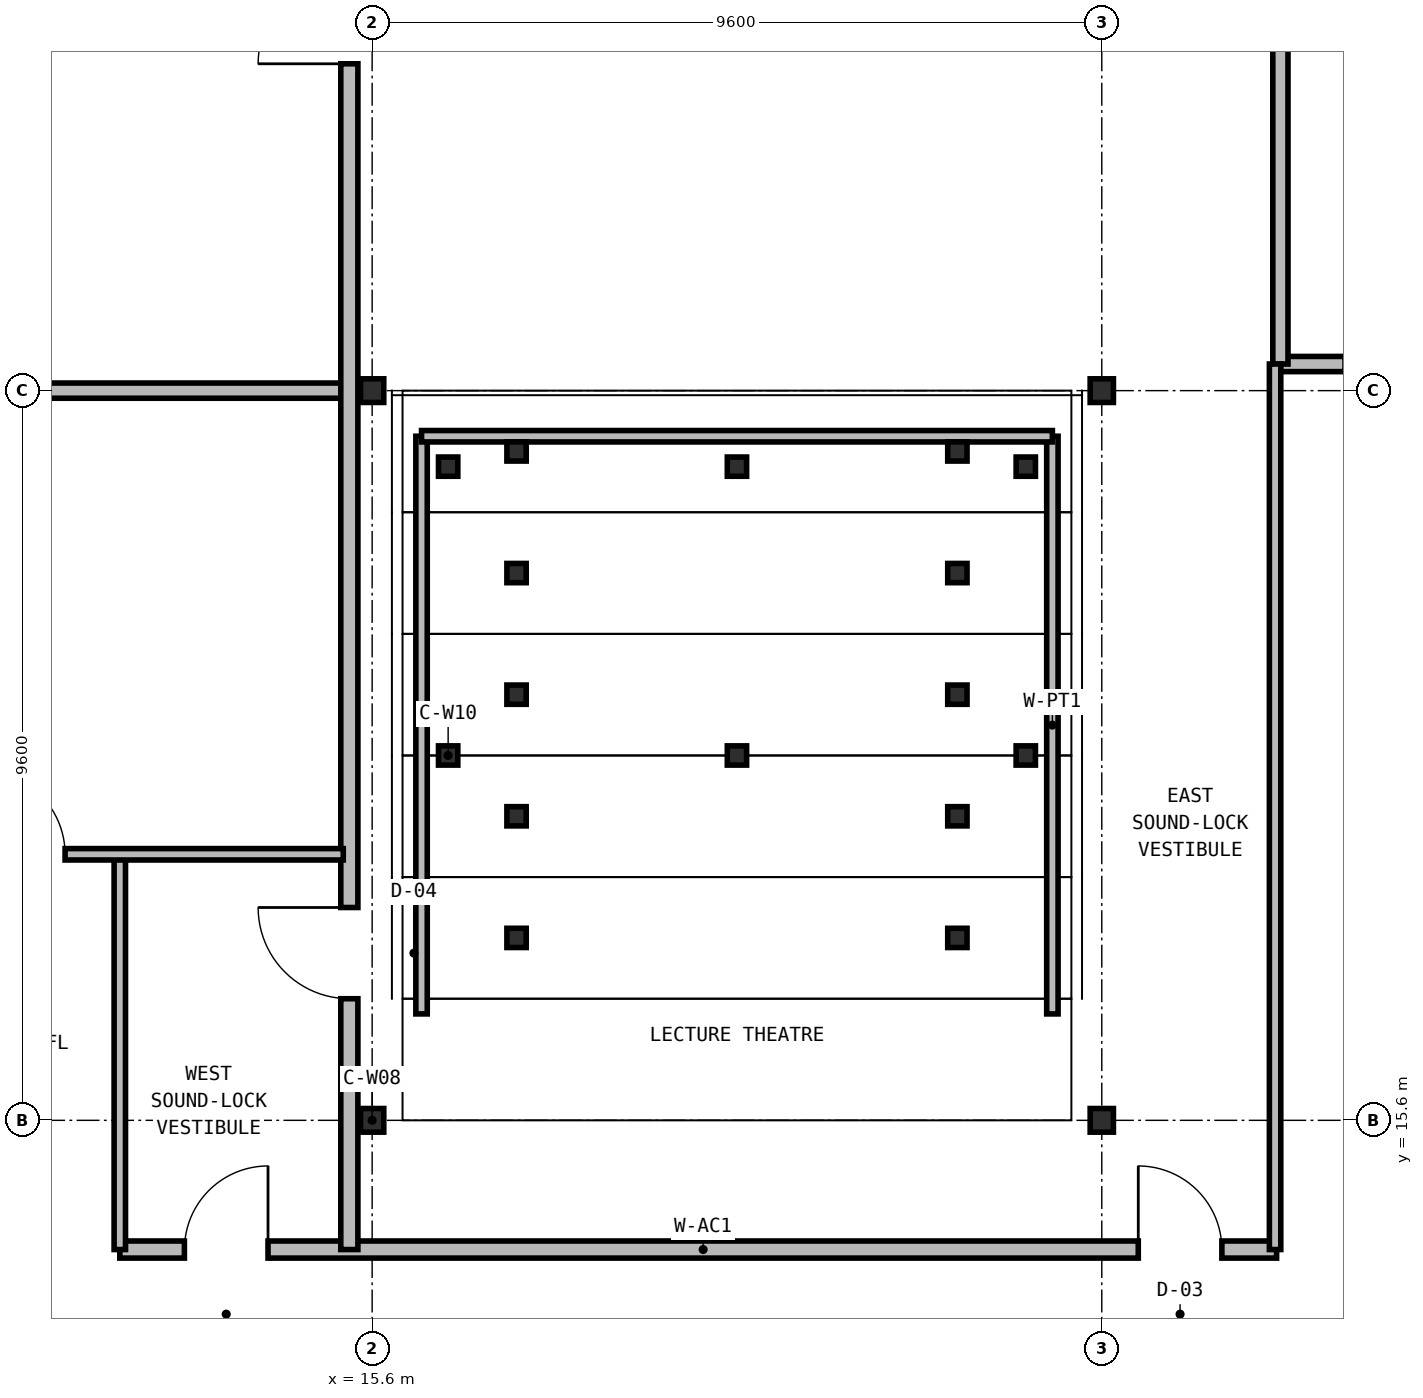
"""IFC4 building model, lengths in metres.
Left out: names, types, materials, properties, quantities, classifications, styles, units other than length and angle.
Written with IfcOpenShell. Run it as: python <this file> out.ifc"""

import sys

from ifc_helpers import new_model, si_unit, direction, frame, frame_2d, origin, origin_2d, place, context, subcontext, project, spatial, rectangle, i_section, extrude, element, fill, save


model = new_model("IFC4")
c1 = context("Model", 3, precision=1e-05, world=origin(), true_north=direction((0.0, 1.0)))
c2 = subcontext(c1, "Body", "Model", "MODEL_VIEW")
j1 = project(units=[si_unit("LENGTHUNIT", "METRE"), si_unit("PLANEANGLEUNIT", "RADIAN")], contexts=[c1])
p1 = place(None, origin())
s1 = spatial("IfcSite", under=j1, at=p1, CompositionType="ELEMENT")
p2 = place(p1, origin())
s2 = spatial("IfcBuilding", under=s1, at=p2, CompositionType="ELEMENT")
p3 = place(p2, origin())
s3 = spatial("IfcBuildingStorey", under=s2, at=p3, CompositionType="ELEMENT", Elevation=0.0)
for number, where, z_axis, x_axis in (
    (1, (15.6, 15.6, 0.0), (0.0, 0.0, 1.0), (1.0, 0.0, 0.0)),
    (2, (15.6, 25.2, 0.0), (0.0, 0.0, 1.0), (1.0, 0.0, 0.0)),
    (3, (25.2, 15.6, 0.0), (0.0, 0.0, 1.0), (1.0, 0.0, 0.0)),
    (4, (25.2, 25.2, 0.0), (0.0, 0.0, 1.0), (1.0, 0.0, 0.0)),
):
    element("IfcColumn", number, at=place(p3, frame(where, z_axis=z_axis, x_axis=x_axis)), inside=s3, PredefinedType="COLUMN", context=c2, shape_type="SweptSolid", body=[
        extrude(i_section(OverallWidth=0.306, OverallDepth=0.311, WebThickness=0.011, FlangeThickness=0.017, at=origin_2d()), origin(), (0.0, 0.0, 1.0), 5.25),
    ])
p4 = place(p3, frame((16.6, 20.4, 0.0), z_axis=(0.0, 0.0, 1.0), x_axis=(1.0, 0.0, 0.0)))
e5 = element("IfcColumn", 5, at=p4, inside=s3, PredefinedType="COLUMN", context=c2, shape_type="SweptSolid", body=[
    extrude(i_section(OverallWidth=0.254, OverallDepth=0.253, WebThickness=0.009, FlangeThickness=0.014, at=origin_2d()), origin(), (0.0, 0.0, 1.0), 1.18),
])
p5 = place(p3, frame((16.6, 24.2, 0.0), z_axis=(0.0, 0.0, 1.0), x_axis=(1.0, 0.0, 0.0)))
e6 = element("IfcColumn", 6, at=p5, inside=s3, PredefinedType="COLUMN", context=c2, shape_type="SweptSolid", body=[
    extrude(i_section(OverallWidth=0.254, OverallDepth=0.253, WebThickness=0.009, FlangeThickness=0.014, at=origin_2d()), origin(), (0.0, 0.0, 1.0), 2.42),
])
p6 = place(p3, frame((20.4, 20.4, 0.0), z_axis=(0.0, 0.0, 1.0), x_axis=(1.0, 0.0, 0.0)))
e7 = element("IfcColumn", 7, at=p6, inside=s3, PredefinedType="COLUMN", context=c2, shape_type="SweptSolid", body=[
    extrude(i_section(OverallWidth=0.254, OverallDepth=0.253, WebThickness=0.009, FlangeThickness=0.014, at=origin_2d()), origin(), (0.0, 0.0, 1.0), 1.18),
])
p7 = place(p3, frame((20.4, 24.2, 0.0), z_axis=(0.0, 0.0, 1.0), x_axis=(1.0, 0.0, 0.0)))
e8 = element("IfcColumn", 8, at=p7, inside=s3, PredefinedType="COLUMN", context=c2, shape_type="SweptSolid", body=[
    extrude(i_section(OverallWidth=0.254, OverallDepth=0.253, WebThickness=0.009, FlangeThickness=0.014, at=origin_2d()), origin(), (0.0, 0.0, 1.0), 2.42),
])
p8 = place(p3, frame((24.2, 20.4, 0.0), z_axis=(0.0, 0.0, 1.0), x_axis=(1.0, 0.0, 0.0)))
e9 = element("IfcColumn", 9, at=p8, inside=s3, PredefinedType="COLUMN", context=c2, shape_type="SweptSolid", body=[
    extrude(i_section(OverallWidth=0.254, OverallDepth=0.253, WebThickness=0.009, FlangeThickness=0.014, at=origin_2d()), origin(), (0.0, 0.0, 1.0), 1.18),
])
p9 = place(p3, frame((24.2, 24.2, 0.0), z_axis=(0.0, 0.0, 1.0), x_axis=(1.0, 0.0, 0.0)))
e10 = element("IfcColumn", 10, at=p9, inside=s3, PredefinedType="COLUMN", context=c2, shape_type="SweptSolid", body=[
    extrude(i_section(OverallWidth=0.254, OverallDepth=0.253, WebThickness=0.009, FlangeThickness=0.014, at=origin_2d()), origin(), (0.0, 0.0, 1.0), 2.42),
])
for number, where, z_axis, x_axis in (
    (11, (17.5, 18.0, 0.0), (0.0, 0.0, 1.0), (1.0, 0.0, 0.0)),
    (12, (23.3, 18.0, 0.0), (0.0, 0.0, 1.0), (1.0, 0.0, 0.0)),
):
    element("IfcColumn", number, at=place(p3, frame(where, z_axis=z_axis, x_axis=x_axis)), inside=s3, PredefinedType="COLUMN", context=c2, shape_type="SweptSolid", body=[
        extrude(i_section(OverallWidth=0.254, OverallDepth=0.253, WebThickness=0.009, FlangeThickness=0.014, at=origin_2d()), origin(), (0.0, 0.0, 1.0), 0.74),
    ])
for number, where, z_axis, x_axis in (
    (13, (17.5, 19.6, 0.0), (0.0, 0.0, 1.0), (1.0, 0.0, 0.0)),
    (14, (23.3, 19.6, 0.0), (0.0, 0.0, 1.0), (1.0, 0.0, 0.0)),
):
    element("IfcColumn", number, at=place(p3, frame(where, z_axis=z_axis, x_axis=x_axis)), inside=s3, PredefinedType="COLUMN", context=c2, shape_type="SweptSolid", body=[
        extrude(i_section(OverallWidth=0.254, OverallDepth=0.253, WebThickness=0.009, FlangeThickness=0.014, at=origin_2d()), origin(), (0.0, 0.0, 1.0), 1.19),
    ])
for number, where, z_axis, x_axis in (
    (15, (17.5, 21.2, 0.0), (0.0, 0.0, 1.0), (1.0, 0.0, 0.0)),
    (16, (23.3, 21.2, 0.0), (0.0, 0.0, 1.0), (1.0, 0.0, 0.0)),
):
    element("IfcColumn", number, at=place(p3, frame(where, z_axis=z_axis, x_axis=x_axis)), inside=s3, PredefinedType="COLUMN", context=c2, shape_type="SweptSolid", body=[
        extrude(i_section(OverallWidth=0.254, OverallDepth=0.253, WebThickness=0.009, FlangeThickness=0.014, at=origin_2d()), origin(), (0.0, 0.0, 1.0), 1.64),
    ])
for number, where, z_axis, x_axis in (
    (17, (17.5, 22.8, 0.0), (0.0, 0.0, 1.0), (1.0, 0.0, 0.0)),
    (18, (23.3, 22.8, 0.0), (0.0, 0.0, 1.0), (1.0, 0.0, 0.0)),
):
    element("IfcColumn", number, at=place(p3, frame(where, z_axis=z_axis, x_axis=x_axis)), inside=s3, PredefinedType="COLUMN", context=c2, shape_type="SweptSolid", body=[
        extrude(i_section(OverallWidth=0.254, OverallDepth=0.253, WebThickness=0.009, FlangeThickness=0.014, at=origin_2d()), origin(), (0.0, 0.0, 1.0), 2.09),
    ])
for number, where, z_axis, x_axis in (
    (19, (17.5, 24.4, 0.0), (0.0, 0.0, 1.0), (1.0, 0.0, 0.0)),
    (20, (23.3, 24.4, 0.0), (0.0, 0.0, 1.0), (1.0, 0.0, 0.0)),
):
    element("IfcColumn", number, at=place(p3, frame(where, z_axis=z_axis, x_axis=x_axis)), inside=s3, PredefinedType="COLUMN", context=c2, shape_type="SweptSolid", body=[
        extrude(i_section(OverallWidth=0.254, OverallDepth=0.253, WebThickness=0.009, FlangeThickness=0.014, at=origin_2d()), origin(), (0.0, 0.0, 1.0), 2.54),
    ])
p10 = place(p3, frame((6.16, 25.2, 0.0), z_axis=(0.0, 0.0, 1.0), x_axis=(1.0, 0.0, 0.0)))
e21 = element("IfcWall", 21, at=p10, inside=s3, PredefinedType="SOLIDWALL", context=c2, shape_type="SweptSolid", body=[
    extrude(rectangle(XDim=9.28, YDim=0.2, at=frame_2d((4.64, 0.0))), origin(), (0.0, 0.0, 1.0), 4.517),
])
p11 = place(p3, frame((27.55, 25.55, 0.0), z_axis=(0.0, 0.0, 1.0), x_axis=(1.0, 0.0, 0.0)))
e22 = element("IfcWall", 22, at=p11, inside=s3, PredefinedType="SOLIDWALL", context=c2, shape_type="SweptSolid", body=[
    extrude(rectangle(XDim=2.95, YDim=0.2, at=frame_2d((1.475, 0.0))), origin(), (0.0, 0.0, 1.0), 4.93),
])
p12 = place(p11, frame((0.85, 0.0, 0.0)))
e23 = element("IfcOpeningElement", 23, at=p12, cuts=e22, PredefinedType="OPENING", context=c2, shape_type="SweptSolid", body=[
    extrude(rectangle(XDim=1.1, YDim=2.15, at=frame_2d((0.55, 1.075))), frame((0.0, 0.11, 0.0), z_axis=(0.0, -1.0, 0.0), x_axis=(1.0, 0.0, 0.0)), (0.0, 0.0, 1.0), 0.22),
])
p13 = place(p3, frame((27.55, 25.55, 0.0), z_axis=(0.0, 0.0, 1.0), x_axis=(0.0, 1.0, 0.0)))
e24 = element("IfcWall", 24, at=p13, inside=s3, PredefinedType="SOLIDWALL", context=c2, shape_type="SweptSolid", body=[
    extrude(rectangle(XDim=9.09, YDim=0.2, at=frame_2d((4.545, 0.0))), origin(), (0.0, 0.0, 1.0), 4.93),
])
p14 = place(p13, frame((6.4, 0.0, 0.0)))
e25 = element("IfcOpeningElement", 25, at=p14, cuts=e24, PredefinedType="OPENING", context=c2, shape_type="SweptSolid", body=[
    extrude(rectangle(XDim=1.1, YDim=2.15, at=frame_2d((0.55, 1.075))), frame((0.0, 0.11, 0.0), z_axis=(0.0, -1.0, 0.0), x_axis=(1.0, 0.0, 0.0)), (0.0, 0.0, 1.0), 0.22),
])
for number, where, z_axis, x_axis in (
    (26, (16.25, 17.0, 0.0), (0.0, 0.0, 1.0), (0.0, 1.0, 0.0)),
    (27, (24.55, 17.0, 0.0), (0.0, 0.0, 1.0), (0.0, 1.0, 0.0)),
):
    element("IfcWall", number, at=place(p3, frame(where, z_axis=z_axis, x_axis=x_axis)), inside=s3, PredefinedType="PARTITIONING", context=c2, shape_type="SweptSolid", body=[
        extrude(rectangle(XDim=7.6, YDim=0.15, at=frame_2d((3.8, 0.0))), origin(), (0.0, 0.0, 1.0), 4.93),
    ])
p15 = place(p3, frame((16.25, 24.6, 0.0), z_axis=(0.0, 0.0, 1.0), x_axis=(1.0, 0.0, 0.0)))
e28 = element("IfcWall", 28, at=p15, inside=s3, PredefinedType="PARTITIONING", context=c2, shape_type="SweptSolid", body=[
    extrude(rectangle(XDim=8.3, YDim=0.15, at=frame_2d((4.15, 0.0))), origin(), (0.0, 0.0, 1.0), 4.93),
])
p16 = place(p3, frame((12.28, 13.9, 0.0), z_axis=(0.0, 0.0, 1.0), x_axis=(1.0, 0.0, 0.0)))
e29 = element("IfcWall", 29, at=p16, inside=s3, PredefinedType="SOLIDWALL", context=c2, shape_type="SweptSolid", body=[
    extrude(rectangle(XDim=15.22, YDim=0.225, at=frame_2d((7.61, 0.0))), origin(), (0.0, 0.0, 1.0), 4.93),
])
p17 = place(p16, frame((0.85, 0.0, 0.0)))
e30 = element("IfcOpeningElement", 30, at=p17, cuts=e29, PredefinedType="OPENING", context=c2, shape_type="SweptSolid", body=[
    extrude(rectangle(XDim=1.1, YDim=2.2, at=frame_2d((0.55, 1.1))), frame((0.0, 0.123, 0.0), z_axis=(0.0, -1.0, 0.0), x_axis=(1.0, 0.0, 0.0)), (0.0, 0.0, 1.0), 0.245),
])
p18 = place(p16, frame((13.4, 0.0, 0.0)))
e31 = element("IfcOpeningElement", 31, at=p18, cuts=e29, PredefinedType="OPENING", context=c2, shape_type="SweptSolid", body=[
    extrude(rectangle(XDim=1.1, YDim=2.2, at=frame_2d((0.55, 1.1))), frame((0.0, 0.123, 0.0), z_axis=(0.0, -1.0, 0.0), x_axis=(1.0, 0.0, 0.0)), (0.0, 0.0, 1.0), 0.245),
])
p19 = place(p3, frame((12.28, 13.9, 0.0), z_axis=(0.0, 0.0, 1.0), x_axis=(0.0, 1.0, 0.0)))
e32 = element("IfcWall", 32, at=p19, inside=s3, PredefinedType="PARTITIONING", context=c2, shape_type="SweptSolid", body=[
    extrude(rectangle(XDim=5.2, YDim=0.15, at=frame_2d((2.6, 0.0))), origin(), (0.0, 0.0, 1.0), 4.93),
])
p20 = place(p3, frame((27.48, 13.9, 0.0), z_axis=(0.0, 0.0, 1.0), x_axis=(0.0, 1.0, 0.0)))
e33 = element("IfcWall", 33, at=p20, inside=s3, PredefinedType="PARTITIONING", context=c2, shape_type="SweptSolid", body=[
    extrude(rectangle(XDim=11.65, YDim=0.15, at=frame_2d((5.825, 0.0))), origin(), (0.0, 0.0, 1.0), 4.93),
])
p21 = place(p3, frame((15.3, 13.9, 0.0), z_axis=(0.0, 0.0, 1.0), x_axis=(0.0, 1.0, 0.0)))
e34 = element("IfcWall", 34, at=p21, inside=s3, PredefinedType="SOLIDWALL", context=c2, shape_type="SweptSolid", body=[
    extrude(rectangle(XDim=20.74, YDim=0.225, at=frame_2d((10.37, 0.0))), origin(), (0.0, 0.0, 1.0), 4.93),
])
p22 = place(p21, frame((3.3, 0.0, 0.0)))
e35 = element("IfcOpeningElement", 35, at=p22, cuts=e34, PredefinedType="OPENING", context=c2, shape_type="SweptSolid", body=[
    extrude(rectangle(XDim=1.2, YDim=2.2, at=frame_2d((0.6, 1.1))), frame((0.0, 0.123, 0.0), z_axis=(0.0, -1.0, 0.0), x_axis=(1.0, 0.0, 0.0)), (0.0, 0.0, 1.0), 0.245),
])
p23 = place(p21, frame((15.6, 0.0, 0.0)))
e36 = element("IfcOpeningElement", 36, at=p23, cuts=e34, PredefinedType="OPENING", context=c2, shape_type="SweptSolid", body=[
    extrude(rectangle(XDim=1.2, YDim=2.2, at=frame_2d((0.6, 1.1))), frame((0.0, 0.123, 0.0), z_axis=(0.0, -1.0, 0.0), x_axis=(1.0, 0.0, 0.0)), (0.0, 0.0, 1.0), 0.245),
])
p24 = place(p21, frame((18.3, 0.0, 0.0)))
e37 = element("IfcOpeningElement", 37, at=p24, cuts=e34, PredefinedType="OPENING", context=c2, shape_type="SweptSolid", body=[
    extrude(rectangle(XDim=1.1, YDim=2.2, at=frame_2d((0.55, 1.1))), frame((0.0, 0.123, 0.0), z_axis=(0.0, -1.0, 0.0), x_axis=(1.0, 0.0, 0.0)), (0.0, 0.0, 1.0), 0.245),
])
p25 = place(p3, frame((6.16, 19.1, 0.0), z_axis=(0.0, 0.0, 1.0), x_axis=(1.0, 0.0, 0.0)))
e38 = element("IfcWall", 38, at=p25, inside=s3, PredefinedType="PARTITIONING", context=c2, shape_type="SweptSolid", body=[
    extrude(rectangle(XDim=9.06, YDim=0.15, at=frame_2d((4.53, 0.0))), origin(), (0.0, 0.0, 1.0), 4.93),
])
p26 = place(p25, frame((4.3, 0.0, 0.0)))
e39 = element("IfcOpeningElement", 39, at=p26, cuts=e38, PredefinedType="OPENING", context=c2, shape_type="SweptSolid", body=[
    extrude(rectangle(XDim=1.1, YDim=2.2, at=frame_2d((0.55, 1.1))), frame((0.0, 0.085, 0.0), z_axis=(0.0, -1.0, 0.0), x_axis=(1.0, 0.0, 0.0)), (0.0, 0.0, 1.0), 0.17),
])
p27 = place(p17, origin())
e40 = element("IfcDoor", 40, at=p27, inside=s3, OperationType="SINGLE_SWING_RIGHT", PredefinedType="DOOR", context=c2, shape_type="SweptSolid", body=[
    extrude(rectangle(XDim=1.1, YDim=2.2, at=frame_2d((0.55, 1.1))), frame((0.0, 0.025, 0.0), z_axis=(0.0, -1.0, 0.0), x_axis=(1.0, 0.0, 0.0)), (0.0, 0.0, 1.0), 0.05),
])
fill(e30, e40)
p28 = place(p18, origin())
e41 = element("IfcDoor", 41, at=p28, inside=s3, OperationType="SINGLE_SWING_LEFT", PredefinedType="DOOR", context=c2, shape_type="SweptSolid", body=[
    extrude(rectangle(XDim=1.1, YDim=2.2, at=frame_2d((0.55, 1.1))), frame((0.0, 0.025, 0.0), z_axis=(0.0, -1.0, 0.0), x_axis=(1.0, 0.0, 0.0)), (0.0, 0.0, 1.0), 0.05),
])
fill(e31, e41)
p29 = place(p22, origin())
e42 = element("IfcDoor", 42, at=p29, inside=s3, OperationType="SINGLE_SWING_RIGHT", PredefinedType="DOOR", context=c2, shape_type="SweptSolid", body=[
    extrude(rectangle(XDim=1.2, YDim=2.2, at=frame_2d((0.6, 1.1))), frame((0.0, 0.025, 0.0), z_axis=(0.0, -1.0, 0.0), x_axis=(1.0, 0.0, 0.0)), (0.0, 0.0, 1.0), 0.05),
])
fill(e35, e42)
p30 = place(p23, origin())
e43 = element("IfcDoor", 43, at=p30, inside=s3, OperationType="SINGLE_SWING_LEFT", PredefinedType="DOOR", context=c2, shape_type="SweptSolid", body=[
    extrude(rectangle(XDim=1.2, YDim=2.2, at=frame_2d((0.6, 1.1))), frame((0.0, 0.025, 0.0), z_axis=(0.0, -1.0, 0.0), x_axis=(1.0, 0.0, 0.0)), (0.0, 0.0, 1.0), 0.05),
])
fill(e36, e43)
p31 = place(p26, origin())
e44 = element("IfcDoor", 44, at=p31, inside=s3, OperationType="SINGLE_SWING_LEFT", PredefinedType="DOOR", context=c2, shape_type="SweptSolid", body=[
    extrude(rectangle(XDim=1.1, YDim=2.2, at=frame_2d((0.55, 1.1))), frame((0.0, 0.025, 0.0), z_axis=(0.0, -1.0, 0.0), x_axis=(1.0, 0.0, 0.0)), (0.0, 0.0, 1.0), 0.05),
])
fill(e39, e44)
save(model, sys.argv[1])
